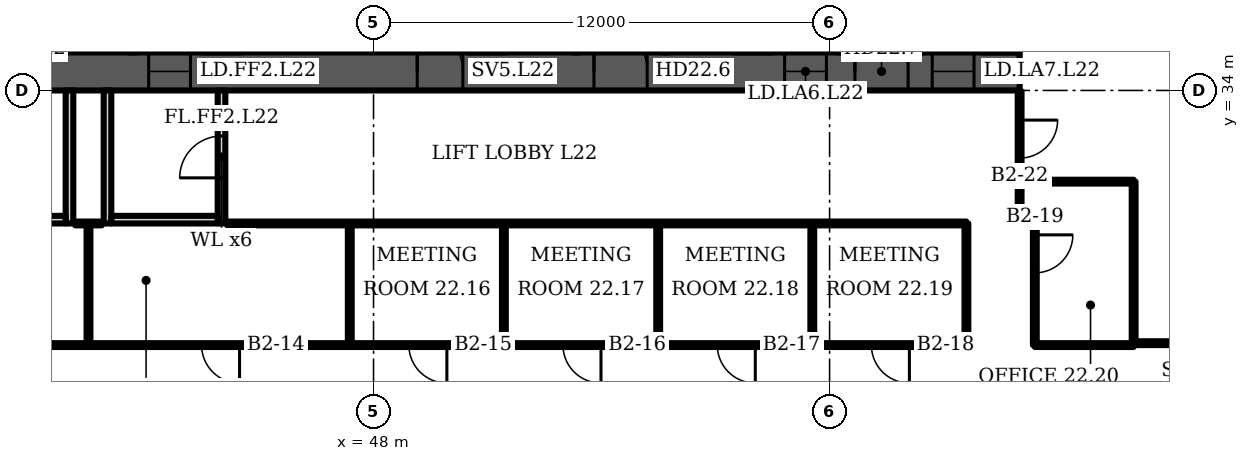
"""IFC4 building model, lengths in metres.
Left out: names, types, materials, properties, quantities, classifications, styles, units other than length and angle.
Written with IfcOpenShell. Run it as: python <this file> out.ifc"""

import sys

from ifc_helpers import new_model, si_unit, direction, frame, frame_2d, origin, place, context, subcontext, project, spatial, rectangle, extrude, element, fill, save


model = new_model("IFC4")
c1 = context("Model", 3, precision=1e-05, world=origin(), true_north=direction((0.0, 1.0)))
c2 = subcontext(c1, "Body", "Model", "MODEL_VIEW")
j1 = project(units=[si_unit("LENGTHUNIT", "METRE"), si_unit("PLANEANGLEUNIT", "RADIAN")], contexts=[c1])
p1 = place(None, origin())
s1 = spatial("IfcSite", under=j1, at=p1, CompositionType="ELEMENT")
p2 = place(p1, origin())
s2 = spatial("IfcBuilding", under=s1, at=p2, CompositionType="ELEMENT")
p3 = place(p2, frame((0.0, 0.0, 100.3)))
s3 = spatial("IfcBuildingStorey", under=s2, at=p3, CompositionType="ELEMENT", Elevation=100.3)
p4 = place(p3, frame((16.0, 34.5, 0.0), z_axis=(0.0, 0.0, 1.0), x_axis=(1.0, 0.0, 0.0)))
e1 = element("IfcWall", 1, at=p4, inside=s3, PredefinedType="SHEAR", context=c2, shape_type="SweptSolid", body=[
    extrude(rectangle(XDim=49.0, YDim=1.0, at=frame_2d((24.5, 0.0))), origin(), (0.0, 0.0, 1.0), 3.6),
])
p5 = place(p4, frame((1.2, 0.0, 0.0)))
e2 = element("IfcOpeningElement", 2, at=p5, cuts=e1, PredefinedType="OPENING", context=c2, shape_type="SweptSolid", body=[
    extrude(rectangle(XDim=1.1, YDim=2.1, at=frame_2d((0.55, 1.05))), frame((0.0, 0.51, 0.0), z_axis=(0.0, -1.0, 0.0), x_axis=(1.0, 0.0, 0.0)), (0.0, 0.0, 1.0), 1.02),
])
p6 = place(p4, frame((5.083, 0.0, 0.0)))
e3 = element("IfcOpeningElement", 3, at=p6, cuts=e1, PredefinedType="OPENING", context=c2, shape_type="SweptSolid", body=[
    extrude(rectangle(XDim=1.1, YDim=2.1, at=frame_2d((0.55, 1.05))), frame((0.0, 0.51, 0.0), z_axis=(0.0, -1.0, 0.0), x_axis=(1.0, 0.0, 0.0)), (0.0, 0.0, 1.0), 1.02),
])
p7 = place(p4, frame((2.933, 0.0, 0.0)))
e4 = element("IfcOpeningElement", 4, at=p7, cuts=e1, PredefinedType="OPENING", context=c2, shape_type="SweptSolid", body=[
    extrude(rectangle(XDim=1.4, YDim=2.1, at=frame_2d((0.7, 1.05))), frame((0.0, 0.51, 0.0), z_axis=(0.0, -1.0, 0.0), x_axis=(1.0, 0.0, 0.0)), (0.0, 0.0, 1.0), 1.02),
])
p8 = place(p4, frame((7.65, 0.0, 0.0)))
e5 = element("IfcOpeningElement", 5, at=p8, cuts=e1, PredefinedType="OPENING", context=c2, shape_type="SweptSolid", body=[
    extrude(rectangle(XDim=1.2, YDim=2.1, at=frame_2d((0.6, 1.05))), frame((0.0, 0.51, 0.0), z_axis=(0.0, -1.0, 0.0), x_axis=(1.0, 0.0, 0.0)), (0.0, 0.0, 1.0), 1.02),
])
p9 = place(p4, frame((14.817, 0.0, 0.0)))
e6 = element("IfcOpeningElement", 6, at=p9, cuts=e1, PredefinedType="OPENING", context=c2, shape_type="SweptSolid", body=[
    extrude(rectangle(XDim=1.1, YDim=2.1, at=frame_2d((0.55, 1.05))), frame((0.0, 0.51, 0.0), z_axis=(0.0, -1.0, 0.0), x_axis=(1.0, 0.0, 0.0)), (0.0, 0.0, 1.0), 1.02),
])
p10 = place(p4, frame((19.083, 0.0, 0.0)))
e7 = element("IfcOpeningElement", 7, at=p10, cuts=e1, PredefinedType="OPENING", context=c2, shape_type="SweptSolid", body=[
    extrude(rectangle(XDim=1.1, YDim=2.1, at=frame_2d((0.55, 1.05))), frame((0.0, 0.51, 0.0), z_axis=(0.0, -1.0, 0.0), x_axis=(1.0, 0.0, 0.0)), (0.0, 0.0, 1.0), 1.02),
])
p11 = place(p4, frame((16.8, 0.0, 0.0)))
e8 = element("IfcOpeningElement", 8, at=p11, cuts=e1, PredefinedType="OPENING", context=c2, shape_type="SweptSolid", body=[
    extrude(rectangle(XDim=1.4, YDim=2.1, at=frame_2d((0.7, 1.05))), frame((0.0, 0.51, 0.0), z_axis=(0.0, -1.0, 0.0), x_axis=(1.0, 0.0, 0.0)), (0.0, 0.0, 1.0), 1.02),
])
p12 = place(p4, frame((21.817, 0.0, 0.0)))
e9 = element("IfcOpeningElement", 9, at=p12, cuts=e1, PredefinedType="OPENING", context=c2, shape_type="SweptSolid", body=[
    extrude(rectangle(XDim=1.1, YDim=2.1, at=frame_2d((0.55, 1.05))), frame((0.0, 0.51, 0.0), z_axis=(0.0, -1.0, 0.0), x_axis=(1.0, 0.0, 0.0)), (0.0, 0.0, 1.0), 1.02),
])
p13 = place(p4, frame((26.083, 0.0, 0.0)))
e10 = element("IfcOpeningElement", 10, at=p13, cuts=e1, PredefinedType="OPENING", context=c2, shape_type="SweptSolid", body=[
    extrude(rectangle(XDim=1.1, YDim=2.1, at=frame_2d((0.55, 1.05))), frame((0.0, 0.51, 0.0), z_axis=(0.0, -1.0, 0.0), x_axis=(1.0, 0.0, 0.0)), (0.0, 0.0, 1.0), 1.02),
])
p14 = place(p4, frame((33.15, 0.0, 0.0)))
e11 = element("IfcOpeningElement", 11, at=p14, cuts=e1, PredefinedType="OPENING", context=c2, shape_type="SweptSolid", body=[
    extrude(rectangle(XDim=1.2, YDim=2.1, at=frame_2d((0.6, 1.05))), frame((0.0, 0.51, 0.0), z_axis=(0.0, -1.0, 0.0), x_axis=(1.0, 0.0, 0.0)), (0.0, 0.0, 1.0), 1.02),
])
p15 = place(p4, frame((37.8, 0.0, 0.0)))
e12 = element("IfcOpeningElement", 12, at=p15, cuts=e1, PredefinedType="OPENING", context=c2, shape_type="SweptSolid", body=[
    extrude(rectangle(XDim=1.4, YDim=2.1, at=frame_2d((0.7, 1.05))), frame((0.0, 0.51, 0.0), z_axis=(0.0, -1.0, 0.0), x_axis=(1.0, 0.0, 0.0)), (0.0, 0.0, 1.0), 1.02),
])
p16 = place(p4, frame((42.817, 0.0, 0.0)))
e13 = element("IfcOpeningElement", 13, at=p16, cuts=e1, PredefinedType="OPENING", context=c2, shape_type="SweptSolid", body=[
    extrude(rectangle(XDim=1.1, YDim=2.1, at=frame_2d((0.55, 1.05))), frame((0.0, 0.51, 0.0), z_axis=(0.0, -1.0, 0.0), x_axis=(1.0, 0.0, 0.0)), (0.0, 0.0, 1.0), 1.02),
])
p17 = place(p4, frame((46.7, 0.0, 0.0)))
e14 = element("IfcOpeningElement", 14, at=p17, cuts=e1, PredefinedType="OPENING", context=c2, shape_type="SweptSolid", body=[
    extrude(rectangle(XDim=1.1, YDim=2.1, at=frame_2d((0.55, 1.05))), frame((0.0, 0.51, 0.0), z_axis=(0.0, -1.0, 0.0), x_axis=(1.0, 0.0, 0.0)), (0.0, 0.0, 1.0), 1.02),
])
p18 = place(p4, frame((44.667, 0.0, 0.0)))
e15 = element("IfcOpeningElement", 15, at=p18, cuts=e1, PredefinedType="OPENING", context=c2, shape_type="SweptSolid", body=[
    extrude(rectangle(XDim=1.4, YDim=2.1, at=frame_2d((0.7, 1.05))), frame((0.0, 0.51, 0.0), z_axis=(0.0, -1.0, 0.0), x_axis=(1.0, 0.0, 0.0)), (0.0, 0.0, 1.0), 1.02),
])
p19 = place(p3, frame((40.0, 30.5, 0.0), z_axis=(0.0, 0.0, 1.0), x_axis=(0.0, 1.0, 0.0)))
e16 = element("IfcWall", 16, at=p19, inside=s3, PredefinedType="PARTITIONING", context=c2, shape_type="SweptSolid", body=[
    extrude(rectangle(XDim=3.5, YDim=0.2, at=frame_2d((1.75, 0.0))), origin(), (0.0, 0.0, 1.0), 3.2),
])
p20 = place(p3, frame((37.1, 30.6, 0.0), z_axis=(0.0, 0.0, 1.0), x_axis=(1.0, 0.0, 0.0)))
e17 = element("IfcWall", 17, at=p20, inside=s3, PredefinedType="PARTITIONING", context=c2, shape_type="SweptSolid", body=[
    extrude(rectangle(XDim=2.8, YDim=0.2, at=frame_2d((1.4, 0.0))), origin(), (0.0, 0.0, 1.0), 3.2),
])
p21 = place(p3, frame((41.0, 30.5, 0.0), z_axis=(0.0, 0.0, 1.0), x_axis=(0.0, 1.0, 0.0)))
e18 = element("IfcWall", 18, at=p21, inside=s3, PredefinedType="PARTITIONING", context=c2, shape_type="SweptSolid", body=[
    extrude(rectangle(XDim=3.5, YDim=0.2, at=frame_2d((1.75, 0.0))), origin(), (0.0, 0.0, 1.0), 3.2),
])
p22 = place(p3, frame((44.0, 30.5, 0.0), z_axis=(0.0, 0.0, 1.0), x_axis=(0.0, 1.0, 0.0)))
e19 = element("IfcWall", 19, at=p22, inside=s3, PredefinedType="PARTITIONING", context=c2, shape_type="SweptSolid", body=[
    extrude(rectangle(XDim=3.5, YDim=0.2, at=frame_2d((1.75, 0.0))), origin(), (0.0, 0.0, 1.0), 3.2),
])
p23 = place(p22, frame((1.2, 0.0, 0.0)))
e20 = element("IfcOpeningElement", 20, at=p23, cuts=e19, PredefinedType="OPENING", context=c2, shape_type="SweptSolid", body=[
    extrude(rectangle(XDim=1.1, YDim=2.1, at=frame_2d((0.55, 1.05))), frame((0.0, 0.11, 0.0), z_axis=(0.0, -1.0, 0.0), x_axis=(1.0, 0.0, 0.0)), (0.0, 0.0, 1.0), 0.22),
])
p24 = place(p3, frame((41.1, 30.6, 0.0), z_axis=(0.0, 0.0, 1.0), x_axis=(1.0, 0.0, 0.0)))
e21 = element("IfcWall", 21, at=p24, inside=s3, PredefinedType="PARTITIONING", context=c2, shape_type="SweptSolid", body=[
    extrude(rectangle(XDim=2.8, YDim=0.2, at=frame_2d((1.4, 0.0))), origin(), (0.0, 0.0, 1.0), 3.2),
])
p25 = place(p3, frame((21.2, 27.3, 0.0), z_axis=(0.0, 0.0, 1.0), x_axis=(1.0, 0.0, 0.0)))
e22 = element("IfcWall", 22, at=p25, inside=s3, PredefinedType="PARTITIONING", context=c2, shape_type="SweptSolid", body=[
    extrude(rectangle(XDim=42.4, YDim=0.1, at=frame_2d((21.2, 0.0))), origin(), (0.0, 0.0, 1.0), 3.2),
])
p26 = place(p25, frame((22.275, 0.0, 0.0)))
e23 = element("IfcOpeningElement", 23, at=p26, cuts=e22, PredefinedType="OPENING", context=c2, shape_type="SweptSolid", body=[
    extrude(rectangle(XDim=1.0, YDim=2.1, at=frame_2d((0.5, 1.05))), frame((0.0, 0.06, 0.0), z_axis=(0.0, -1.0, 0.0), x_axis=(1.0, 0.0, 0.0)), (0.0, 0.0, 1.0), 0.12),
])
p27 = place(p25, frame((27.73, 0.0, 0.0)))
e24 = element("IfcOpeningElement", 24, at=p27, cuts=e22, PredefinedType="OPENING", context=c2, shape_type="SweptSolid", body=[
    extrude(rectangle(XDim=1.0, YDim=2.1, at=frame_2d((0.5, 1.05))), frame((0.0, 0.06, 0.0), z_axis=(0.0, -1.0, 0.0), x_axis=(1.0, 0.0, 0.0)), (0.0, 0.0, 1.0), 0.12),
])
p28 = place(p25, frame((31.785, 0.0, 0.0)))
e25 = element("IfcOpeningElement", 25, at=p28, cuts=e22, PredefinedType="OPENING", context=c2, shape_type="SweptSolid", body=[
    extrude(rectangle(XDim=1.0, YDim=2.1, at=frame_2d((0.5, 1.05))), frame((0.0, 0.06, 0.0), z_axis=(0.0, -1.0, 0.0), x_axis=(1.0, 0.0, 0.0)), (0.0, 0.0, 1.0), 0.12),
])
p29 = place(p25, frame((35.845, 0.0, 0.0)))
e26 = element("IfcOpeningElement", 26, at=p29, cuts=e22, PredefinedType="OPENING", context=c2, shape_type="SweptSolid", body=[
    extrude(rectangle(XDim=1.0, YDim=2.1, at=frame_2d((0.5, 1.05))), frame((0.0, 0.06, 0.0), z_axis=(0.0, -1.0, 0.0), x_axis=(1.0, 0.0, 0.0)), (0.0, 0.0, 1.0), 0.12),
])
p30 = place(p25, frame((39.9, 0.0, 0.0)))
e27 = element("IfcOpeningElement", 27, at=p30, cuts=e22, PredefinedType="OPENING", context=c2, shape_type="SweptSolid", body=[
    extrude(rectangle(XDim=1.0, YDim=2.1, at=frame_2d((0.5, 1.05))), frame((0.0, 0.06, 0.0), z_axis=(0.0, -1.0, 0.0), x_axis=(1.0, 0.0, 0.0)), (0.0, 0.0, 1.0), 0.12),
])
for number, where, z_axis, x_axis in (
    (28, (40.5, 27.3, 0.0), (0.0, 0.0, 1.0), (0.0, 1.0, 0.0)),
    (29, (47.375, 27.3, 0.0), (0.0, 0.0, 1.0), (0.0, 1.0, 0.0)),
    (30, (51.43, 27.3, 0.0), (0.0, 0.0, 1.0), (0.0, 1.0, 0.0)),
    (31, (55.49, 27.3, 0.0), (0.0, 0.0, 1.0), (0.0, 1.0, 0.0)),
    (32, (59.545, 27.3, 0.0), (0.0, 0.0, 1.0), (0.0, 1.0, 0.0)),
    (33, (63.6, 27.3, 0.0), (0.0, 0.0, 1.0), (0.0, 1.0, 0.0)),
):
    element("IfcWall", number, at=place(p3, frame(where, z_axis=z_axis, x_axis=x_axis)), inside=s3, PredefinedType="PARTITIONING", context=c2, shape_type="SweptSolid", body=[
        extrude(rectangle(XDim=3.2, YDim=0.1, at=frame_2d((1.6, 0.0))), origin(), (0.0, 0.0, 1.0), 3.2),
    ])
p31 = place(p3, frame((65.0, 30.56, 0.0), z_axis=(0.0, 0.0, 1.0), x_axis=(0.0, 1.0, 0.0)))
e34 = element("IfcWall", 34, at=p31, inside=s3, PredefinedType="PARTITIONING", context=c2, shape_type="SweptSolid", body=[
    extrude(rectangle(XDim=3.42, YDim=0.1, at=frame_2d((1.71, 0.0))), origin(), (0.0, 0.0, 1.0), 3.2),
])
p32 = place(p31, frame((1.66, 0.0, 0.0)))
e35 = element("IfcOpeningElement", 35, at=p32, cuts=e34, PredefinedType="OPENING", context=c2, shape_type="SweptSolid", body=[
    extrude(rectangle(XDim=1.0, YDim=2.1, at=frame_2d((0.5, 1.05))), frame((0.0, 0.06, 0.0), z_axis=(0.0, -1.0, 0.0), x_axis=(1.0, 0.0, 0.0)), (0.0, 0.0, 1.0), 0.12),
])
p33 = place(p3, frame((65.0, 31.6, 0.0), z_axis=(0.0, 0.0, 1.0), x_axis=(1.0, 0.0, 0.0)))
e36 = element("IfcWall", 36, at=p33, inside=s3, PredefinedType="PARTITIONING", context=c2, shape_type="SweptSolid", body=[
    extrude(rectangle(XDim=3.0, YDim=0.1, at=frame_2d((1.5, 0.0))), origin(), (0.0, 0.0, 1.0), 3.2),
])
p34 = place(p3, frame((65.395, 30.5, 0.0), z_axis=(0.0, 0.0, 1.0), x_axis=(-0.988637, 0.150312, 0.0)))
e37 = element("IfcWall", 37, at=p34, inside=s3, PredefinedType="PARTITIONING", context=c2, shape_type="SweptSolid", body=[
    extrude(rectangle(XDim=0.4, YDim=0.1, at=frame_2d((0.2, 0.0))), origin(), (0.0, 0.0, 1.0), 3.2),
])
p35 = place(p3, frame((65.4, 27.3, 0.0), z_axis=(0.0, 0.0, 1.0), x_axis=(0.0, 1.0, 0.0)))
e38 = element("IfcWall", 38, at=p35, inside=s3, PredefinedType="PARTITIONING", context=c2, shape_type="SweptSolid", body=[
    extrude(rectangle(XDim=3.2, YDim=0.1, at=frame_2d((1.6, 0.0))), origin(), (0.0, 0.0, 1.0), 3.2),
])
p36 = place(p35, frame((1.9, 0.0, 0.0)))
e39 = element("IfcOpeningElement", 39, at=p36, cuts=e38, PredefinedType="OPENING", context=c2, shape_type="SweptSolid", body=[
    extrude(rectangle(XDim=1.0, YDim=2.1, at=frame_2d((0.5, 1.05))), frame((0.0, 0.06, 0.0), z_axis=(0.0, -1.0, 0.0), x_axis=(1.0, 0.0, 0.0)), (0.0, 0.0, 1.0), 0.12),
])
p37 = place(p3, frame((65.4, 27.3, 0.0), z_axis=(0.0, 0.0, 1.0), x_axis=(1.0, 0.0, 0.0)))
e40 = element("IfcWall", 40, at=p37, inside=s3, PredefinedType="PARTITIONING", context=c2, shape_type="SweptSolid", body=[
    extrude(rectangle(XDim=2.6, YDim=0.1, at=frame_2d((1.3, 0.0))), origin(), (0.0, 0.0, 1.0), 3.2),
])
p38 = place(p3, frame((68.0, 27.3, 0.0), z_axis=(0.0, 0.0, 1.0), x_axis=(0.0, 1.0, 0.0)))
e41 = element("IfcWall", 41, at=p38, inside=s3, PredefinedType="PARTITIONING", context=c2, shape_type="SweptSolid", body=[
    extrude(rectangle(XDim=4.3, YDim=0.1, at=frame_2d((2.15, 0.0))), origin(), (0.0, 0.0, 1.0), 3.2),
])
p39 = place(p3, frame((68.05, 27.35, 0.0), z_axis=(0.0, 0.0, 1.0), x_axis=(1.0, 0.0, 0.0)))
e42 = element("IfcWall", 42, at=p39, inside=s3, PredefinedType="PARTITIONING", context=c2, shape_type="SweptSolid", body=[
    extrude(rectangle(XDim=1.62, YDim=0.1, at=frame_2d((0.81, 0.0))), origin(), (0.0, 0.0, 1.0), 3.2),
])
p40 = place(p3, frame((40.15, 30.5, 0.0), z_axis=(0.0, 0.0, 1.0), x_axis=(1.0, 0.0, 0.0)))
e43 = element("IfcWall", 43, at=p40, inside=s3, PredefinedType="PARTITIONING", context=c2, shape_type="SweptSolid", body=[
    extrude(rectangle(XDim=0.7, YDim=0.1, at=frame_2d((0.35, 0.0))), origin(), (0.0, 0.0, 1.0), 3.2),
])
p41 = place(p3, frame((44.15, 30.5, 0.0), z_axis=(0.0, 0.0, 1.0), x_axis=(1.0, 0.0, 0.0)))
e44 = element("IfcWall", 44, at=p41, inside=s3, PredefinedType="PARTITIONING", context=c2, shape_type="SweptSolid", body=[
    extrude(rectangle(XDim=19.45, YDim=0.1, at=frame_2d((9.725, 0.0))), origin(), (0.0, 0.0, 1.0), 3.2),
])
p42 = place(p13, origin())
e45 = element("IfcDoor", 45, at=p42, inside=s3, OperationType="DOUBLE_DOOR_SLIDING", PredefinedType="DOOR", context=c2, shape_type="SweptSolid", body=[
    extrude(rectangle(XDim=1.1, YDim=2.1, at=frame_2d((0.55, 1.05))), frame((0.0, 0.025, 0.0), z_axis=(0.0, -1.0, 0.0), x_axis=(1.0, 0.0, 0.0)), (0.0, 0.0, 1.0), 0.05),
])
fill(e10, e45)
p43 = place(p14, origin())
e46 = element("IfcDoor", 46, at=p43, inside=s3, OperationType="SINGLE_SWING_LEFT", PredefinedType="DOOR", context=c2, shape_type="SweptSolid", body=[
    extrude(rectangle(XDim=1.2, YDim=2.1, at=frame_2d((0.6, 1.05))), frame((0.0, 0.025, 0.0), z_axis=(0.0, -1.0, 0.0), x_axis=(1.0, 0.0, 0.0)), (0.0, 0.0, 1.0), 0.05),
])
fill(e11, e46)
p44 = place(p15, origin())
e47 = element("IfcDoor", 47, at=p44, inside=s3, OperationType="DOUBLE_DOOR_SINGLE_SWING", PredefinedType="DOOR", context=c2, shape_type="SweptSolid", body=[
    extrude(rectangle(XDim=1.4, YDim=2.1, at=frame_2d((0.7, 1.05))), frame((0.0, 0.025, 0.0), z_axis=(0.0, -1.0, 0.0), x_axis=(1.0, 0.0, 0.0)), (0.0, 0.0, 1.0), 0.05),
])
fill(e12, e47)
p45 = place(p16, origin())
e48 = element("IfcDoor", 48, at=p45, inside=s3, OperationType="DOUBLE_DOOR_SLIDING", PredefinedType="DOOR", context=c2, shape_type="SweptSolid", body=[
    extrude(rectangle(XDim=1.1, YDim=2.1, at=frame_2d((0.55, 1.05))), frame((0.0, 0.025, 0.0), z_axis=(0.0, -1.0, 0.0), x_axis=(1.0, 0.0, 0.0)), (0.0, 0.0, 1.0), 0.05),
])
fill(e13, e48)
p46 = place(p17, origin())
e49 = element("IfcDoor", 49, at=p46, inside=s3, OperationType="DOUBLE_DOOR_SLIDING", PredefinedType="DOOR", context=c2, shape_type="SweptSolid", body=[
    extrude(rectangle(XDim=1.1, YDim=2.1, at=frame_2d((0.55, 1.05))), frame((0.0, 0.025, 0.0), z_axis=(0.0, -1.0, 0.0), x_axis=(1.0, 0.0, 0.0)), (0.0, 0.0, 1.0), 0.05),
])
fill(e14, e49)
p47 = place(p18, origin())
e50 = element("IfcDoor", 50, at=p47, inside=s3, OperationType="DOUBLE_DOOR_SINGLE_SWING", PredefinedType="DOOR", context=c2, shape_type="SweptSolid", body=[
    extrude(rectangle(XDim=1.4, YDim=2.1, at=frame_2d((0.7, 1.05))), frame((0.0, 0.025, 0.0), z_axis=(0.0, -1.0, 0.0), x_axis=(1.0, 0.0, 0.0)), (0.0, 0.0, 1.0), 0.05),
])
fill(e15, e50)
p48 = place(p23, origin())
e51 = element("IfcDoor", 51, at=p48, inside=s3, OperationType="SINGLE_SWING_LEFT", PredefinedType="DOOR", context=c2, shape_type="SweptSolid", body=[
    extrude(rectangle(XDim=1.1, YDim=2.1, at=frame_2d((0.55, 1.05))), frame((0.0, 0.025, 0.0), z_axis=(0.0, -1.0, 0.0), x_axis=(1.0, 0.0, 0.0)), (0.0, 0.0, 1.0), 0.05),
])
fill(e20, e51)
p49 = place(p26, origin())
e52 = element("IfcDoor", 52, at=p49, inside=s3, OperationType="SINGLE_SWING_RIGHT", PredefinedType="DOOR", context=c2, shape_type="SweptSolid", body=[
    extrude(rectangle(XDim=1.0, YDim=2.1, at=frame_2d((0.5, 1.05))), frame((0.0, 0.025, 0.0), z_axis=(0.0, -1.0, 0.0), x_axis=(1.0, 0.0, 0.0)), (0.0, 0.0, 1.0), 0.05),
])
fill(e23, e52)
p50 = place(p27, origin())
e53 = element("IfcDoor", 53, at=p50, inside=s3, OperationType="SINGLE_SWING_RIGHT", PredefinedType="DOOR", context=c2, shape_type="SweptSolid", body=[
    extrude(rectangle(XDim=1.0, YDim=2.1, at=frame_2d((0.5, 1.05))), frame((0.0, 0.025, 0.0), z_axis=(0.0, -1.0, 0.0), x_axis=(1.0, 0.0, 0.0)), (0.0, 0.0, 1.0), 0.05),
])
fill(e24, e53)
p51 = place(p28, origin())
e54 = element("IfcDoor", 54, at=p51, inside=s3, OperationType="SINGLE_SWING_RIGHT", PredefinedType="DOOR", context=c2, shape_type="SweptSolid", body=[
    extrude(rectangle(XDim=1.0, YDim=2.1, at=frame_2d((0.5, 1.05))), frame((0.0, 0.025, 0.0), z_axis=(0.0, -1.0, 0.0), x_axis=(1.0, 0.0, 0.0)), (0.0, 0.0, 1.0), 0.05),
])
fill(e25, e54)
p52 = place(p29, origin())
e55 = element("IfcDoor", 55, at=p52, inside=s3, OperationType="SINGLE_SWING_RIGHT", PredefinedType="DOOR", context=c2, shape_type="SweptSolid", body=[
    extrude(rectangle(XDim=1.0, YDim=2.1, at=frame_2d((0.5, 1.05))), frame((0.0, 0.025, 0.0), z_axis=(0.0, -1.0, 0.0), x_axis=(1.0, 0.0, 0.0)), (0.0, 0.0, 1.0), 0.05),
])
fill(e26, e55)
p53 = place(p30, origin())
e56 = element("IfcDoor", 56, at=p53, inside=s3, OperationType="SINGLE_SWING_RIGHT", PredefinedType="DOOR", context=c2, shape_type="SweptSolid", body=[
    extrude(rectangle(XDim=1.0, YDim=2.1, at=frame_2d((0.5, 1.05))), frame((0.0, 0.025, 0.0), z_axis=(0.0, -1.0, 0.0), x_axis=(1.0, 0.0, 0.0)), (0.0, 0.0, 1.0), 0.05),
])
fill(e27, e56)
p54 = place(p36, origin())
e57 = element("IfcDoor", 57, at=p54, inside=s3, OperationType="SINGLE_SWING_RIGHT", PredefinedType="DOOR", context=c2, shape_type="SweptSolid", body=[
    extrude(rectangle(XDim=1.0, YDim=2.1, at=frame_2d((0.5, 1.05))), frame((0.0, 0.025, 0.0), z_axis=(0.0, -1.0, 0.0), x_axis=(1.0, 0.0, 0.0)), (0.0, 0.0, 1.0), 0.05),
])
fill(e39, e57)
p55 = place(p32, origin())
e58 = element("IfcDoor", 58, at=p55, inside=s3, OperationType="SINGLE_SWING_RIGHT", PredefinedType="DOOR", context=c2, shape_type="SweptSolid", body=[
    extrude(rectangle(XDim=1.0, YDim=2.1, at=frame_2d((0.5, 1.05))), frame((0.0, 0.025, 0.0), z_axis=(0.0, -1.0, 0.0), x_axis=(1.0, 0.0, 0.0)), (0.0, 0.0, 1.0), 0.05),
])
fill(e35, e58)
save(model, sys.argv[1])
